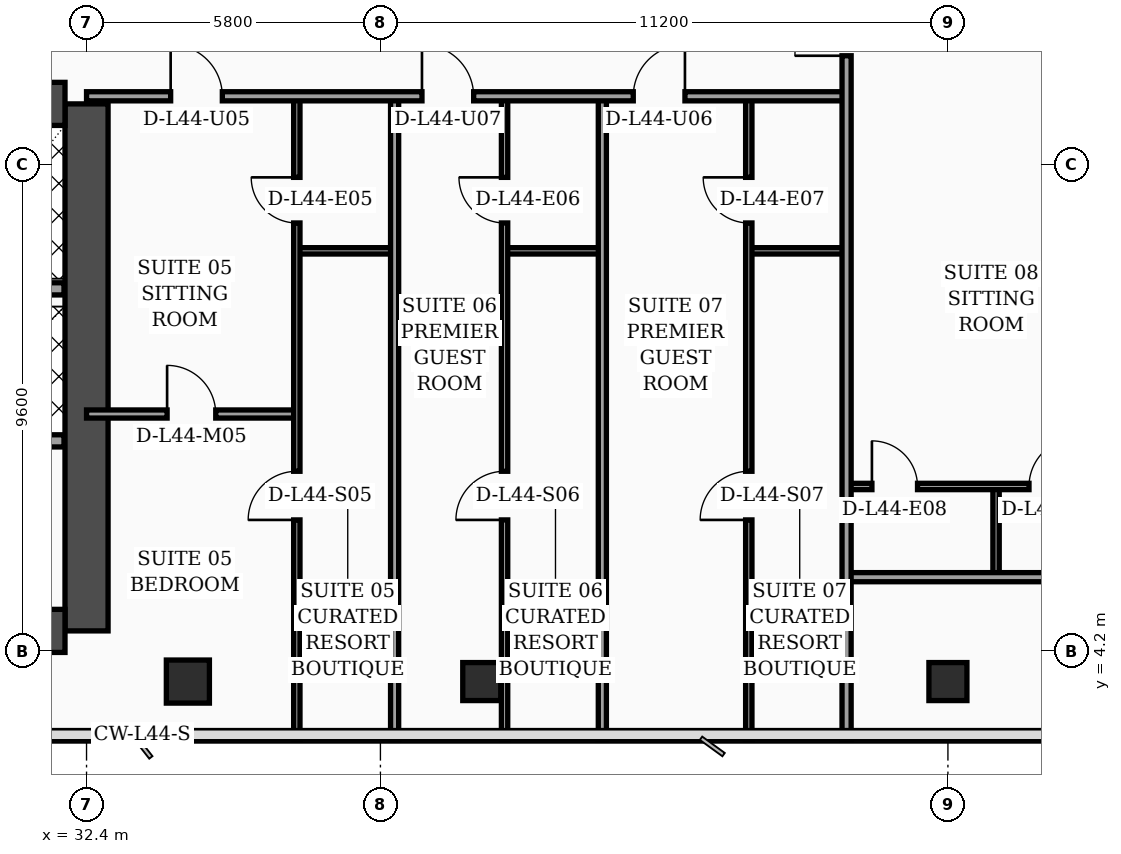
"""IFC4 building model, lengths in metres.
Left out: names, types, materials, properties, quantities, classifications, styles, units other than length and angle.
Written with IfcOpenShell. Run it as: python <this file> out.ifc"""

import sys

from ifc_helpers import new_model, si_unit, direction, frame, frame_2d, origin, origin_2d, place, context, subcontext, project, spatial, rectangle, hollow_rectangle, extrude, element, fill, save


model = new_model("IFC4")
c1 = context("Model", 3, precision=1e-05, world=origin(), true_north=direction((0.0, 1.0)))
c2 = subcontext(c1, "Body", "Model", "MODEL_VIEW")
j1 = project(units=[si_unit("LENGTHUNIT", "METRE"), si_unit("PLANEANGLEUNIT", "RADIAN")], contexts=[c1])
p1 = place(None, origin())
s1 = spatial("IfcSite", under=j1, at=p1, CompositionType="ELEMENT")
p2 = place(p1, origin())
s2 = spatial("IfcBuilding", under=s1, at=p2, CompositionType="ELEMENT")
p3 = place(p2, frame((0.0, 0.0, 178.9)))
s3 = spatial("IfcBuildingStorey", under=s2, at=p3, CompositionType="ELEMENT", Elevation=178.9)
p4 = place(p3, frame((32.4, 4.6, 0.0), z_axis=(0.0, 0.0, 1.0), x_axis=(0.0, 1.0, 0.0)))
e1 = element("IfcWall", 1, at=p4, inside=s3, PredefinedType="SHEAR", context=c2, shape_type="SweptSolid", body=[
    extrude(rectangle(XDim=10.4, YDim=0.85, at=frame_2d((5.2, 0.0))), origin(), (0.0, 0.0, 1.0), 3.56),
])
p5 = place(p3, frame((22.025, 15.0, 0.0), z_axis=(0.0, 0.0, 1.0), x_axis=(1.0, 0.0, 0.0)))
e2 = element("IfcWall", 2, at=p5, inside=s3, PredefinedType="SHEAR", context=c2, shape_type="SweptSolid", body=[
    extrude(rectangle(XDim=9.95, YDim=0.85, at=frame_2d((4.975, 0.0))), origin(), (0.0, 0.0, 1.0), 3.56),
])
p6 = place(p5, frame((4.88, 0.0, 0.0)))
e3 = element("IfcOpeningElement", 3, at=p6, cuts=e2, PredefinedType="OPENING", context=c2, shape_type="SweptSolid", body=[
    extrude(rectangle(XDim=1.1, YDim=2.2, at=frame_2d((0.55, 1.1))), frame((0.0, 0.435, 0.0), z_axis=(0.0, -1.0, 0.0), x_axis=(1.0, 0.0, 0.0)), (0.0, 0.0, 1.0), 0.87),
])
p7 = place(p3, frame((22.025, 4.6, 0.0), z_axis=(0.0, 0.0, 1.0), x_axis=(1.0, 0.0, 0.0)))
e4 = element("IfcWall", 4, at=p7, inside=s3, PredefinedType="SHEAR", context=c2, shape_type="SweptSolid", body=[
    extrude(rectangle(XDim=9.95, YDim=0.85, at=frame_2d((4.975, 0.0))), origin(), (0.0, 0.0, 1.0), 3.56),
])
p8 = place(p3, frame((34.4, 3.6, 0.0), z_axis=(0.0, 0.0, 1.0), x_axis=(1.0, 0.0, 0.0)))
e5 = element("IfcColumn", 5, at=p8, inside=s3, PredefinedType="COLUMN", context=c2, shape_type="SweptSolid", body=[
    extrude(hollow_rectangle(XDim=0.85, YDim=0.85, WallThickness=0.036, at=origin_2d()), origin(), (0.0, 0.0, 1.0), 3.56),
])
for number, where, z_axis, x_axis in (
    (6, (40.2, 3.6, 0.0), (0.0, 0.0, 1.0), (1.0, 0.0, 0.0)),
    (7, (49.4, 3.6, 0.0), (0.0, 0.0, 1.0), (1.0, 0.0, 0.0)),
):
    element("IfcColumn", number, at=place(p3, frame(where, z_axis=z_axis, x_axis=x_axis)), inside=s3, PredefinedType="COLUMN", context=c2, shape_type="SweptSolid", body=[
        extrude(hollow_rectangle(XDim=0.75, YDim=0.75, WallThickness=0.032, at=origin_2d()), origin(), (0.0, 0.0, 1.0), 3.56),
    ])
p9 = place(p3, frame((59.23, 5.505, 0.0), z_axis=(0.0, 0.0, 1.0), x_axis=(-0.300509063924, 0.953778958931, 0.0)))
e8 = element("IfcWall", 8, at=p9, inside=s3, PredefinedType="SOLIDWALL", context=c2, shape_type="SweptSolid", body=[
    extrude(rectangle(XDim=30.814, YDim=0.32, at=frame_2d((15.407, 0.0))), origin(), (0.0, 0.0, 1.0), 3.56),
])
p10 = place(p9, frame((10.199, 0.0, 0.0)))
e9 = element("IfcOpeningElement", 9, at=p10, cuts=e8, PredefinedType="OPENING", context=c2, shape_type="SweptSolid", body=[
    extrude(rectangle(XDim=1.4, YDim=2.25, at=frame_2d((0.7, 1.125))), frame((0.0, 0.17, 0.0), z_axis=(0.0, -1.0, 0.0), x_axis=(1.0, 0.0, 0.0)), (0.0, 0.0, 1.0), 0.34),
])
p11 = place(p9, frame((2.65, 0.0, 0.75)))
e10 = element("IfcOpeningElement", 10, at=p11, cuts=e8, PredefinedType="OPENING", context=c2, shape_type="SweptSolid", body=[
    extrude(rectangle(XDim=1.5, YDim=1.6, at=frame_2d((0.75, 0.8))), frame((0.0, 0.17, 0.0), z_axis=(0.0, -1.0, 0.0), x_axis=(1.0, 0.0, 0.0)), (0.0, 0.0, 1.0), 0.34),
])
p12 = place(p9, frame((4.7, 0.0, 0.75)))
e11 = element("IfcOpeningElement", 11, at=p12, cuts=e8, PredefinedType="OPENING", context=c2, shape_type="SweptSolid", body=[
    extrude(rectangle(XDim=1.5, YDim=1.6, at=frame_2d((0.75, 0.8))), frame((0.0, 0.17, 0.0), z_axis=(0.0, -1.0, 0.0), x_axis=(1.0, 0.0, 0.0)), (0.0, 0.0, 1.0), 0.34),
])
p13 = place(p9, frame((7.8, 0.0, 0.75)))
e12 = element("IfcOpeningElement", 12, at=p13, cuts=e8, PredefinedType="OPENING", context=c2, shape_type="SweptSolid", body=[
    extrude(rectangle(XDim=1.5, YDim=1.6, at=frame_2d((0.75, 0.8))), frame((0.0, 0.17, 0.0), z_axis=(0.0, -1.0, 0.0), x_axis=(1.0, 0.0, 0.0)), (0.0, 0.0, 1.0), 0.34),
])
p14 = place(p9, frame((14.0, 0.0, 0.75)))
e13 = element("IfcOpeningElement", 13, at=p14, cuts=e8, PredefinedType="OPENING", context=c2, shape_type="SweptSolid", body=[
    extrude(rectangle(XDim=1.5, YDim=1.6, at=frame_2d((0.75, 0.8))), frame((0.0, 0.17, 0.0), z_axis=(0.0, -1.0, 0.0), x_axis=(1.0, 0.0, 0.0)), (0.0, 0.0, 1.0), 0.34),
])
p15 = place(p9, frame((17.1, 0.0, 0.75)))
e14 = element("IfcOpeningElement", 14, at=p15, cuts=e8, PredefinedType="OPENING", context=c2, shape_type="SweptSolid", body=[
    extrude(rectangle(XDim=1.5, YDim=1.6, at=frame_2d((0.75, 0.8))), frame((0.0, 0.17, 0.0), z_axis=(0.0, -1.0, 0.0), x_axis=(1.0, 0.0, 0.0)), (0.0, 0.0, 1.0), 0.34),
])
p16 = place(p9, frame((20.2, 0.0, 0.75)))
e15 = element("IfcOpeningElement", 15, at=p16, cuts=e8, PredefinedType="OPENING", context=c2, shape_type="SweptSolid", body=[
    extrude(rectangle(XDim=1.5, YDim=1.6, at=frame_2d((0.75, 0.8))), frame((0.0, 0.17, 0.0), z_axis=(0.0, -1.0, 0.0), x_axis=(1.0, 0.0, 0.0)), (0.0, 0.0, 1.0), 0.34),
])
p17 = place(p9, frame((26.4, 0.0, 0.75)))
e16 = element("IfcOpeningElement", 16, at=p17, cuts=e8, PredefinedType="OPENING", context=c2, shape_type="SweptSolid", body=[
    extrude(rectangle(XDim=1.5, YDim=1.6, at=frame_2d((0.75, 0.8))), frame((0.0, 0.17, 0.0), z_axis=(0.0, -1.0, 0.0), x_axis=(1.0, 0.0, 0.0)), (0.0, 0.0, 1.0), 0.34),
])
p18 = place(p3, frame((27.02, 11.35, 0.0), z_axis=(0.0, 0.0, 1.0), x_axis=(1.0, 0.0, 0.0)))
e17 = element("IfcWall", 17, at=p18, inside=s3, PredefinedType="SOLIDWALL", context=c2, shape_type="SweptSolid", body=[
    extrude(rectangle(XDim=4.935, YDim=0.24, at=frame_2d((2.468, 0.0))), origin(), (0.0, 0.0, 1.0), 3.56),
])
p19 = place(p18, frame((0.45, 0.0, 0.0)))
e18 = element("IfcOpeningElement", 18, at=p19, cuts=e17, PredefinedType="OPENING", context=c2, shape_type="SweptSolid", body=[
    extrude(rectangle(XDim=1.3, YDim=2.35, at=frame_2d((0.65, 1.175))), frame((0.0, 0.13, 0.0), z_axis=(0.0, -1.0, 0.0), x_axis=(1.0, 0.0, 0.0)), (0.0, 0.0, 1.0), 0.26),
])
p20 = place(p3, frame((27.02, 8.35, 0.0), z_axis=(0.0, 0.0, 1.0), x_axis=(1.0, 0.0, 0.0)))
e19 = element("IfcWall", 19, at=p20, inside=s3, PredefinedType="SOLIDWALL", context=c2, shape_type="SweptSolid", body=[
    extrude(rectangle(XDim=4.935, YDim=0.24, at=frame_2d((2.468, 0.0))), origin(), (0.0, 0.0, 1.0), 3.56),
])
p21 = place(p3, frame((36.55, 12.1, 0.0), z_axis=(0.0, 0.0, 1.0), x_axis=(1.0, 0.0, 0.0)))
e20 = element("IfcWall", 20, at=p21, inside=s3, PredefinedType="PARTITIONING", context=c2, shape_type="SweptSolid", body=[
    extrude(rectangle(XDim=1.93, YDim=0.125, at=frame_2d((0.965, 0.0))), origin(), (0.0, 0.0, 1.0), 3.56),
])
p22 = place(p3, frame((32.4, 8.88, 0.0), z_axis=(0.0, 0.0, 1.0), x_axis=(1.0, 0.0, 0.0)))
e21 = element("IfcWall", 21, at=p22, inside=s3, PredefinedType="PARTITIONING", context=c2, shape_type="SweptSolid", body=[
    extrude(rectangle(XDim=4.15, YDim=0.16, at=frame_2d((2.075, 0.0))), origin(), (0.0, 0.0, 1.0), 2.94),
])
p23 = place(p22, frame((1.59, 0.0, 0.0)))
e22 = element("IfcOpeningElement", 22, at=p23, cuts=e21, PredefinedType="OPENING", context=c2, shape_type="SweptSolid", body=[
    extrude(rectangle(XDim=0.96, YDim=2.2, at=frame_2d((0.48, 1.1))), frame((0.0, 0.09, 0.0), z_axis=(0.0, -1.0, 0.0), x_axis=(1.0, 0.0, 0.0)), (0.0, 0.0, 1.0), 0.18),
])
p24 = place(p3, frame((36.55, 2.44, 0.0), z_axis=(0.0, 0.0, 1.0), x_axis=(0.0, 1.0, 0.0)))
e23 = element("IfcWall", 23, at=p24, inside=s3, PredefinedType="PARTITIONING", context=c2, shape_type="SweptSolid", body=[
    extrude(rectangle(XDim=12.71, YDim=0.125, at=frame_2d((6.355, 0.0))), origin(), (0.0, 0.0, 1.0), 2.94),
])
p25 = place(p24, frame((4.35, 0.0, 0.0)))
e24 = element("IfcOpeningElement", 24, at=p25, cuts=e23, PredefinedType="OPENING", context=c2, shape_type="SweptSolid", body=[
    extrude(rectangle(XDim=0.96, YDim=2.2, at=frame_2d((0.48, 1.1))), frame((0.0, 0.073, 0.0), z_axis=(0.0, -1.0, 0.0), x_axis=(1.0, 0.0, 0.0)), (0.0, 0.0, 1.0), 0.145),
])
p26 = place(p24, frame((10.21, 0.0, 0.0)))
e25 = element("IfcOpeningElement", 25, at=p26, cuts=e23, PredefinedType="OPENING", context=c2, shape_type="SweptSolid", body=[
    extrude(rectangle(XDim=0.9, YDim=2.15, at=frame_2d((0.45, 1.075))), frame((0.0, 0.073, 0.0), z_axis=(0.0, -1.0, 0.0), x_axis=(1.0, 0.0, 0.0)), (0.0, 0.0, 1.0), 0.145),
])
p27 = place(p3, frame((40.65, 12.1, 0.0), z_axis=(0.0, 0.0, 1.0), x_axis=(1.0, 0.0, 0.0)))
e26 = element("IfcWall", 26, at=p27, inside=s3, PredefinedType="PARTITIONING", context=c2, shape_type="SweptSolid", body=[
    extrude(rectangle(XDim=1.93, YDim=0.125, at=frame_2d((0.965, 0.0))), origin(), (0.0, 0.0, 1.0), 3.56),
])
p28 = place(p3, frame((40.65, 2.44, 0.0), z_axis=(0.0, 0.0, 1.0), x_axis=(0.0, 1.0, 0.0)))
e27 = element("IfcWall", 27, at=p28, inside=s3, PredefinedType="PARTITIONING", context=c2, shape_type="SweptSolid", body=[
    extrude(rectangle(XDim=12.71, YDim=0.125, at=frame_2d((6.355, 0.0))), origin(), (0.0, 0.0, 1.0), 2.94),
])
p29 = place(p28, frame((4.35, 0.0, 0.0)))
e28 = element("IfcOpeningElement", 28, at=p29, cuts=e27, PredefinedType="OPENING", context=c2, shape_type="SweptSolid", body=[
    extrude(rectangle(XDim=0.96, YDim=2.2, at=frame_2d((0.48, 1.1))), frame((0.0, 0.073, 0.0), z_axis=(0.0, -1.0, 0.0), x_axis=(1.0, 0.0, 0.0)), (0.0, 0.0, 1.0), 0.145),
])
p30 = place(p28, frame((10.21, 0.0, 0.0)))
e29 = element("IfcOpeningElement", 29, at=p30, cuts=e27, PredefinedType="OPENING", context=c2, shape_type="SweptSolid", body=[
    extrude(rectangle(XDim=0.9, YDim=2.15, at=frame_2d((0.45, 1.075))), frame((0.0, 0.073, 0.0), z_axis=(0.0, -1.0, 0.0), x_axis=(1.0, 0.0, 0.0)), (0.0, 0.0, 1.0), 0.145),
])
p31 = place(p3, frame((38.48, 2.44, 0.0), z_axis=(0.0, 0.0, 1.0), x_axis=(0.0, 1.0, 0.0)))
e30 = element("IfcWall", 30, at=p31, inside=s3, PredefinedType="PARTITIONING", context=c2, shape_type="SweptSolid", body=[
    extrude(rectangle(XDim=12.71, YDim=0.16, at=frame_2d((6.355, 0.0))), origin(), (0.0, 0.0, 1.0), 2.94),
])
p32 = place(p3, frame((45.47, 12.1, 0.0), z_axis=(0.0, 0.0, 1.0), x_axis=(1.0, 0.0, 0.0)))
e31 = element("IfcWall", 31, at=p32, inside=s3, PredefinedType="PARTITIONING", context=c2, shape_type="SweptSolid", body=[
    extrude(rectangle(XDim=1.93, YDim=0.125, at=frame_2d((0.965, 0.0))), origin(), (0.0, 0.0, 1.0), 2.94),
])
p33 = place(p3, frame((45.47, 2.44, 0.0), z_axis=(0.0, 0.0, 1.0), x_axis=(0.0, 1.0, 0.0)))
e32 = element("IfcWall", 32, at=p33, inside=s3, PredefinedType="PARTITIONING", context=c2, shape_type="SweptSolid", body=[
    extrude(rectangle(XDim=12.71, YDim=0.125, at=frame_2d((6.355, 0.0))), origin(), (0.0, 0.0, 1.0), 3.04),
])
p34 = place(p33, frame((4.35, 0.0, 0.0)))
e33 = element("IfcOpeningElement", 33, at=p34, cuts=e32, PredefinedType="OPENING", context=c2, shape_type="SweptSolid", body=[
    extrude(rectangle(XDim=0.96, YDim=2.2, at=frame_2d((0.48, 1.1))), frame((0.0, 0.073, 0.0), z_axis=(0.0, -1.0, 0.0), x_axis=(1.0, 0.0, 0.0)), (0.0, 0.0, 1.0), 0.145),
])
p35 = place(p33, frame((10.21, 0.0, 0.0)))
e34 = element("IfcOpeningElement", 34, at=p35, cuts=e32, PredefinedType="OPENING", context=c2, shape_type="SweptSolid", body=[
    extrude(rectangle(XDim=0.9, YDim=2.15, at=frame_2d((0.45, 1.075))), frame((0.0, 0.073, 0.0), z_axis=(0.0, -1.0, 0.0), x_axis=(1.0, 0.0, 0.0)), (0.0, 0.0, 1.0), 0.145),
])
p36 = place(p3, frame((42.58, 2.44, 0.0), z_axis=(0.0, 0.0, 1.0), x_axis=(0.0, 1.0, 0.0)))
e35 = element("IfcWall", 35, at=p36, inside=s3, PredefinedType="PARTITIONING", context=c2, shape_type="SweptSolid", body=[
    extrude(rectangle(XDim=12.71, YDim=0.16, at=frame_2d((6.355, 0.0))), origin(), (0.0, 0.0, 1.0), 3.04),
])
p37 = place(p3, frame((32.4, 15.15, 0.0), z_axis=(0.0, 0.0, 1.0), x_axis=(1.0, 0.0, 0.0)))
e36 = element("IfcWall", 36, at=p37, inside=s3, PredefinedType="PARTITIONING", context=c2, shape_type="SweptSolid", body=[
    extrude(rectangle(XDim=15.0, YDim=0.18, at=frame_2d((7.5, 0.0))), origin(), (0.0, 0.0, 1.0), 2.94),
])
p38 = place(p37, frame((1.66, 0.0, 0.0)))
e37 = element("IfcOpeningElement", 37, at=p38, cuts=e36, PredefinedType="OPENING", context=c2, shape_type="SweptSolid", body=[
    extrude(rectangle(XDim=1.02, YDim=2.2, at=frame_2d((0.51, 1.1))), frame((0.0, 0.1, 0.0), z_axis=(0.0, -1.0, 0.0), x_axis=(1.0, 0.0, 0.0)), (0.0, 0.0, 1.0), 0.2),
])
p39 = place(p37, frame((10.79, 0.0, 0.0)))
e38 = element("IfcOpeningElement", 38, at=p39, cuts=e36, PredefinedType="OPENING", context=c2, shape_type="SweptSolid", body=[
    extrude(rectangle(XDim=1.02, YDim=2.2, at=frame_2d((0.51, 1.1))), frame((0.0, 0.1, 0.0), z_axis=(0.0, -1.0, 0.0), x_axis=(1.0, 0.0, 0.0)), (0.0, 0.0, 1.0), 0.2),
])
p40 = place(p37, frame((6.62, 0.0, 0.0)))
e39 = element("IfcOpeningElement", 39, at=p40, cuts=e36, PredefinedType="OPENING", context=c2, shape_type="SweptSolid", body=[
    extrude(rectangle(XDim=1.02, YDim=2.2, at=frame_2d((0.51, 1.1))), frame((0.0, 0.1, 0.0), z_axis=(0.0, -1.0, 0.0), x_axis=(1.0, 0.0, 0.0)), (0.0, 0.0, 1.0), 0.2),
])
p41 = place(p3, frame((50.35, 5.66, 0.0), z_axis=(0.0, 0.0, 1.0), x_axis=(0.0, 1.0, 0.0)))
e40 = element("IfcWall", 40, at=p41, inside=s3, PredefinedType="PARTITIONING", context=c2, shape_type="SweptSolid", body=[
    extrude(rectangle(XDim=1.79, YDim=0.125, at=frame_2d((0.895, 0.0))), origin(), (0.0, 0.0, 1.0), 3.56),
])
p42 = place(p3, frame((47.4, 7.45, 0.0), z_axis=(0.0, 0.0, 1.0), x_axis=(1.0, 0.0, 0.0)))
e41 = element("IfcWall", 41, at=p42, inside=s3, PredefinedType="PARTITIONING", context=c2, shape_type="SweptSolid", body=[
    extrude(rectangle(XDim=11.16, YDim=0.125, at=frame_2d((5.58, 0.0))), origin(), (0.0, 0.0, 1.0), 2.94),
])
p43 = place(p42, frame((0.5, 0.0, 0.0)))
e42 = element("IfcOpeningElement", 42, at=p43, cuts=e41, PredefinedType="OPENING", context=c2, shape_type="SweptSolid", body=[
    extrude(rectangle(XDim=0.9, YDim=2.15, at=frame_2d((0.45, 1.075))), frame((0.0, 0.073, 0.0), z_axis=(0.0, -1.0, 0.0), x_axis=(1.0, 0.0, 0.0)), (0.0, 0.0, 1.0), 0.145),
])
p44 = place(p42, frame((3.6, 0.0, 0.0)))
e43 = element("IfcOpeningElement", 43, at=p44, cuts=e41, PredefinedType="OPENING", context=c2, shape_type="SweptSolid", body=[
    extrude(rectangle(XDim=0.96, YDim=2.2, at=frame_2d((0.48, 1.1))), frame((0.0, 0.073, 0.0), z_axis=(0.0, -1.0, 0.0), x_axis=(1.0, 0.0, 0.0)), (0.0, 0.0, 1.0), 0.145),
])
p45 = place(p3, frame((47.4, 5.66, 0.0), z_axis=(0.0, 0.0, 1.0), x_axis=(1.0, 0.0, 0.0)))
e44 = element("IfcWall", 44, at=p45, inside=s3, PredefinedType="PARTITIONING", context=c2, shape_type="SweptSolid", body=[
    extrude(rectangle(XDim=8.6, YDim=0.18, at=frame_2d((4.3, 0.0))), origin(), (0.0, 0.0, 1.0), 2.94),
])
p46 = place(p3, frame((47.4, 2.44, 0.0), z_axis=(0.0, 0.0, 1.0), x_axis=(0.0, 1.0, 0.0)))
e45 = element("IfcWall", 45, at=p46, inside=s3, PredefinedType="PARTITIONING", context=c2, shape_type="SweptSolid", body=[
    extrude(rectangle(XDim=27.84, YDim=0.18, at=frame_2d((13.92, 0.0))), origin(), (0.0, 0.0, 1.0), 2.94),
])
p47 = place(p46, frame((13.51, 0.0, 0.0)))
e46 = element("IfcOpeningElement", 46, at=p47, cuts=e45, PredefinedType="OPENING", context=c2, shape_type="SweptSolid", body=[
    extrude(rectangle(XDim=1.02, YDim=2.2, at=frame_2d((0.51, 1.1))), frame((0.0, 0.1, 0.0), z_axis=(0.0, -1.0, 0.0), x_axis=(1.0, 0.0, 0.0)), (0.0, 0.0, 1.0), 0.2),
])
p48 = place(p46, frame((21.52, 0.0, 0.0)))
e47 = element("IfcOpeningElement", 47, at=p48, cuts=e45, PredefinedType="OPENING", context=c2, shape_type="SweptSolid", body=[
    extrude(rectangle(XDim=1.02, YDim=2.2, at=frame_2d((0.51, 1.1))), frame((0.0, 0.1, 0.0), z_axis=(0.0, -1.0, 0.0), x_axis=(1.0, 0.0, 0.0)), (0.0, 0.0, 1.0), 0.2),
])
p49 = place(p23, origin())
e48 = element("IfcDoor", 48, at=p49, inside=s3, OperationType="SINGLE_SWING_LEFT", PredefinedType="DOOR", context=c2, shape_type="SweptSolid", body=[
    extrude(rectangle(XDim=0.96, YDim=2.2, at=frame_2d((0.48, 1.1))), frame((0.0, 0.025, 0.0), z_axis=(0.0, -1.0, 0.0), x_axis=(1.0, 0.0, 0.0)), (0.0, 0.0, 1.0), 0.05),
])
fill(e22, e48)
p50 = place(p25, origin())
e49 = element("IfcDoor", 49, at=p50, inside=s3, OperationType="SINGLE_SWING_LEFT", PredefinedType="DOOR", context=c2, shape_type="SweptSolid", body=[
    extrude(rectangle(XDim=0.96, YDim=2.2, at=frame_2d((0.48, 1.1))), frame((0.0, 0.025, 0.0), z_axis=(0.0, -1.0, 0.0), x_axis=(1.0, 0.0, 0.0)), (0.0, 0.0, 1.0), 0.05),
])
fill(e24, e49)
p51 = place(p26, origin())
e50 = element("IfcDoor", 50, at=p51, inside=s3, OperationType="SINGLE_SWING_RIGHT", PredefinedType="DOOR", context=c2, shape_type="SweptSolid", body=[
    extrude(rectangle(XDim=0.9, YDim=2.15, at=frame_2d((0.45, 1.075))), frame((0.0, 0.025, 0.0), z_axis=(0.0, -1.0, 0.0), x_axis=(1.0, 0.0, 0.0)), (0.0, 0.0, 1.0), 0.05),
])
fill(e25, e50)
p52 = place(p29, origin())
e51 = element("IfcDoor", 51, at=p52, inside=s3, OperationType="SINGLE_SWING_LEFT", PredefinedType="DOOR", context=c2, shape_type="SweptSolid", body=[
    extrude(rectangle(XDim=0.96, YDim=2.2, at=frame_2d((0.48, 1.1))), frame((0.0, 0.025, 0.0), z_axis=(0.0, -1.0, 0.0), x_axis=(1.0, 0.0, 0.0)), (0.0, 0.0, 1.0), 0.05),
])
fill(e28, e51)
p53 = place(p30, origin())
e52 = element("IfcDoor", 52, at=p53, inside=s3, OperationType="SINGLE_SWING_RIGHT", PredefinedType="DOOR", context=c2, shape_type="SweptSolid", body=[
    extrude(rectangle(XDim=0.9, YDim=2.15, at=frame_2d((0.45, 1.075))), frame((0.0, 0.025, 0.0), z_axis=(0.0, -1.0, 0.0), x_axis=(1.0, 0.0, 0.0)), (0.0, 0.0, 1.0), 0.05),
])
fill(e29, e52)
p54 = place(p34, origin())
e53 = element("IfcDoor", 53, at=p54, inside=s3, OperationType="SINGLE_SWING_LEFT", PredefinedType="DOOR", context=c2, shape_type="SweptSolid", body=[
    extrude(rectangle(XDim=0.96, YDim=2.2, at=frame_2d((0.48, 1.1))), frame((0.0, 0.025, 0.0), z_axis=(0.0, -1.0, 0.0), x_axis=(1.0, 0.0, 0.0)), (0.0, 0.0, 1.0), 0.05),
])
fill(e33, e53)
p55 = place(p35, origin())
e54 = element("IfcDoor", 54, at=p55, inside=s3, OperationType="SINGLE_SWING_RIGHT", PredefinedType="DOOR", context=c2, shape_type="SweptSolid", body=[
    extrude(rectangle(XDim=0.9, YDim=2.15, at=frame_2d((0.45, 1.075))), frame((0.0, 0.025, 0.0), z_axis=(0.0, -1.0, 0.0), x_axis=(1.0, 0.0, 0.0)), (0.0, 0.0, 1.0), 0.05),
])
fill(e34, e54)
p56 = place(p38, origin())
e55 = element("IfcDoor", 55, at=p56, inside=s3, OperationType="SINGLE_SWING_LEFT", PredefinedType="DOOR", context=c2, shape_type="SweptSolid", body=[
    extrude(rectangle(XDim=1.02, YDim=2.2, at=frame_2d((0.51, 1.1))), frame((0.0, 0.025, 0.0), z_axis=(0.0, -1.0, 0.0), x_axis=(1.0, 0.0, 0.0)), (0.0, 0.0, 1.0), 0.05),
])
fill(e37, e55)
p57 = place(p39, origin())
e56 = element("IfcDoor", 56, at=p57, inside=s3, OperationType="SINGLE_SWING_RIGHT", PredefinedType="DOOR", context=c2, shape_type="SweptSolid", body=[
    extrude(rectangle(XDim=1.02, YDim=2.2, at=frame_2d((0.51, 1.1))), frame((0.0, 0.025, 0.0), z_axis=(0.0, -1.0, 0.0), x_axis=(1.0, 0.0, 0.0)), (0.0, 0.0, 1.0), 0.05),
])
fill(e38, e56)
p58 = place(p40, origin())
e57 = element("IfcDoor", 57, at=p58, inside=s3, OperationType="SINGLE_SWING_LEFT", PredefinedType="DOOR", context=c2, shape_type="SweptSolid", body=[
    extrude(rectangle(XDim=1.02, YDim=2.2, at=frame_2d((0.51, 1.1))), frame((0.0, 0.025, 0.0), z_axis=(0.0, -1.0, 0.0), x_axis=(1.0, 0.0, 0.0)), (0.0, 0.0, 1.0), 0.05),
])
fill(e39, e57)
p59 = place(p43, origin())
e58 = element("IfcDoor", 58, at=p59, inside=s3, OperationType="SINGLE_SWING_LEFT", PredefinedType="DOOR", context=c2, shape_type="SweptSolid", body=[
    extrude(rectangle(XDim=0.9, YDim=2.15, at=frame_2d((0.45, 1.075))), frame((0.0, 0.025, 0.0), z_axis=(0.0, -1.0, 0.0), x_axis=(1.0, 0.0, 0.0)), (0.0, 0.0, 1.0), 0.05),
])
fill(e42, e58)
p60 = place(p44, origin())
e59 = element("IfcDoor", 59, at=p60, inside=s3, OperationType="SINGLE_SWING_RIGHT", PredefinedType="DOOR", context=c2, shape_type="SweptSolid", body=[
    extrude(rectangle(XDim=0.96, YDim=2.2, at=frame_2d((0.48, 1.1))), frame((0.0, 0.025, 0.0), z_axis=(0.0, -1.0, 0.0), x_axis=(1.0, 0.0, 0.0)), (0.0, 0.0, 1.0), 0.05),
])
fill(e43, e59)
p61 = place(p47, origin())
e60 = element("IfcDoor", 60, at=p61, inside=s3, OperationType="SINGLE_SWING_LEFT", PredefinedType="DOOR", context=c2, shape_type="SweptSolid", body=[
    extrude(rectangle(XDim=1.02, YDim=2.2, at=frame_2d((0.51, 1.1))), frame((0.0, 0.025, 0.0), z_axis=(0.0, -1.0, 0.0), x_axis=(1.0, 0.0, 0.0)), (0.0, 0.0, 1.0), 0.05),
])
fill(e46, e60)
save(model, sys.argv[1])
